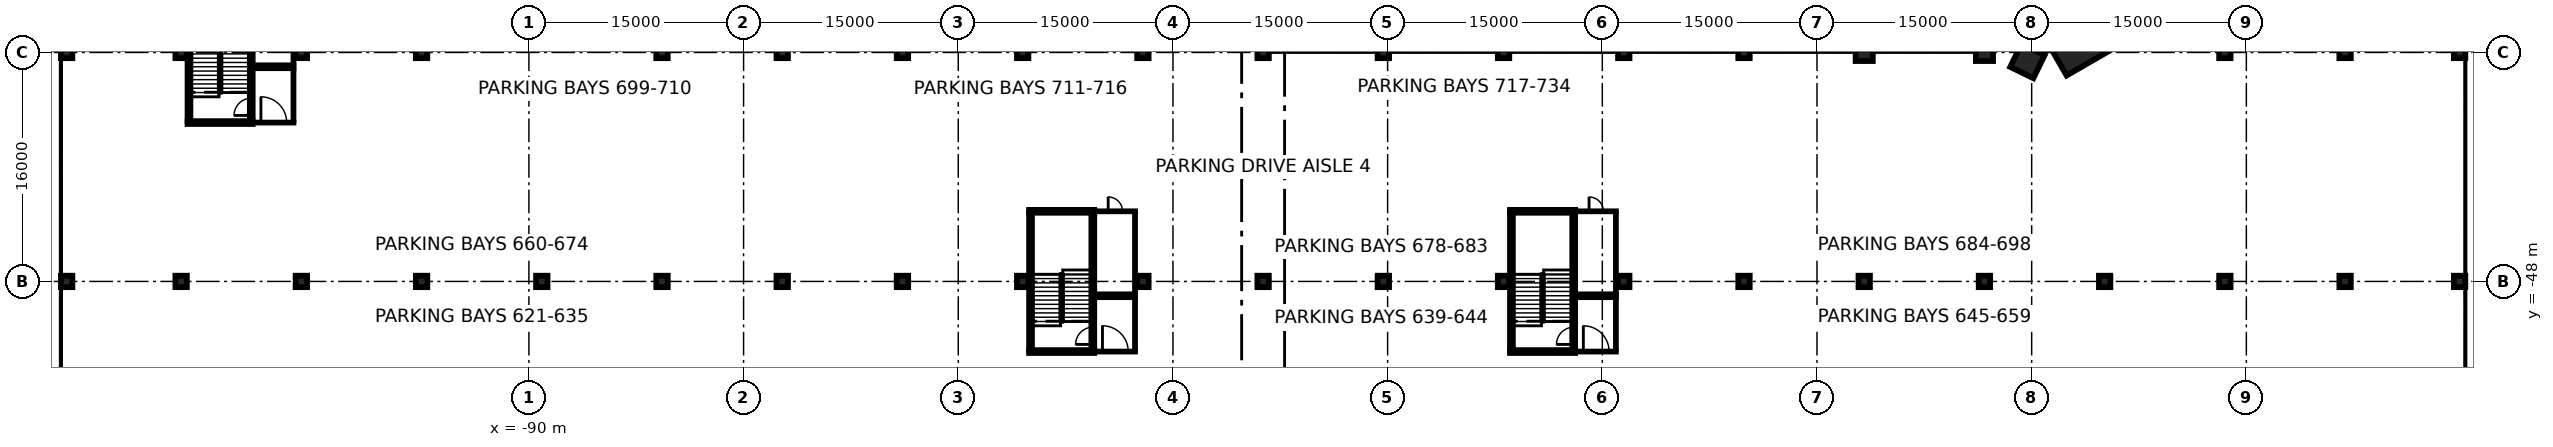
"""IFC4 building model, lengths in metres.
Left out: names, types, materials, properties, quantities, classifications, styles, units other than length and angle.
Written with IfcOpenShell. Run it as: python <this file> out.ifc"""

import sys

from ifc_helpers import new_model, si_unit, direction, frame, frame_2d, origin, origin_2d, place, context, subcontext, project, spatial, rectangle, extrude, element, fill, save


model = new_model("IFC4")
c1 = context("Model", 3, precision=1e-05, world=origin(), true_north=direction((0.0, 1.0)))
c2 = subcontext(c1, "Body", "Model", "MODEL_VIEW")
j1 = project(units=[si_unit("LENGTHUNIT", "METRE"), si_unit("PLANEANGLEUNIT", "RADIAN")], contexts=[c1])
p1 = place(None, origin())
s1 = spatial("IfcSite", under=j1, at=p1, CompositionType="ELEMENT")
p2 = place(p1, origin())
s2 = spatial("IfcBuilding", under=s1, at=p2, CompositionType="ELEMENT")
p3 = place(p2, frame((0.0, 0.0, -12.0)))
s3 = spatial("IfcBuildingStorey", under=s2, at=p3, CompositionType="ELEMENT", Elevation=-12.0)
for number, where, z_axis, x_axis in (
    (1, (-123.15, -80.0, 0.0), (0.0, 0.0, 1.0), (0.0, 1.0, 0.0)),
    (2, (45.75, -80.0, 0.0), (0.0, 0.0, 1.0), (0.0, 1.0, 0.0)),
):
    element("IfcWall", number, at=place(p3, frame(where, z_axis=z_axis, x_axis=x_axis)), inside=s3, PredefinedType="USERDEFINED", context=c2, shape_type="SweptSolid", body=[
        extrude(rectangle(XDim=160.0, YDim=0.9, at=frame_2d((80.0, 0.0))), origin(), (0.0, 0.0, 1.0), 11.55),
    ])
p4 = place(p2, frame((0.0, 0.0, -7.2)))
s4 = spatial("IfcBuildingStorey", under=s2, at=p4, CompositionType="ELEMENT", Elevation=-7.2)
p5 = place(p4, frame((17.865, -30.942, -0.4), z_axis=(0.0, 0.0, 1.0), x_axis=(-0.5, 0.866025403784, 0.0)))
e3 = element("IfcColumn", 3, at=p5, inside=s4, PredefinedType="COLUMN", context=c2, shape_type="SweptSolid", body=[
    extrude(rectangle(XDim=4.2, YDim=3.4, at=origin_2d()), origin(), (0.0, 0.0, 1.0), 3.6),
])
p6 = place(p4, frame((14.705, -32.599, -0.4), z_axis=(0.0, 0.0, 1.0), x_axis=(0.438341341409, 0.898808582743, 0.0)))
e4 = element("IfcColumn", 4, at=p6, inside=s4, PredefinedType="COLUMN", context=c2, shape_type="SweptSolid", body=[
    extrude(rectangle(XDim=1.8, YDim=1.8, at=origin_2d()), origin(), (0.0, 0.0, 1.0), 3.6),
])
for number, where, z_axis, x_axis in (
    (5, (-122.3, -48.0, -0.4), (0.0, 0.0, 1.0), (1.0, 0.0, 0.0)),
    (6, (-122.3, -32.0, -0.4), (0.0, 0.0, 1.0), (1.0, 0.0, 0.0)),
    (7, (-114.3, -48.0, -0.4), (0.0, 0.0, 1.0), (1.0, 0.0, 0.0)),
    (8, (-114.3, -32.0, -0.4), (0.0, 0.0, 1.0), (1.0, 0.0, 0.0)),
    (9, (-105.9, -48.0, -0.4), (0.0, 0.0, 1.0), (1.0, 0.0, 0.0)),
    (10, (-105.9, -32.0, -0.4), (0.0, 0.0, 1.0), (1.0, 0.0, 0.0)),
    (11, (-97.5, -48.0, -0.4), (0.0, 0.0, 1.0), (1.0, 0.0, 0.0)),
    (12, (-97.5, -32.0, -0.4), (0.0, 0.0, 1.0), (1.0, 0.0, 0.0)),
    (13, (-89.1, -48.0, -0.4), (0.0, 0.0, 1.0), (1.0, 0.0, 0.0)),
    (14, (-80.7, -48.0, -0.4), (0.0, 0.0, 1.0), (1.0, 0.0, 0.0)),
    (15, (-80.7, -32.0, -0.4), (0.0, 0.0, 1.0), (1.0, 0.0, 0.0)),
    (16, (-72.3, -48.0, -0.4), (0.0, 0.0, 1.0), (1.0, 0.0, 0.0)),
    (17, (-72.3, -32.0, -0.4), (0.0, 0.0, 1.0), (1.0, 0.0, 0.0)),
    (18, (-63.9, -48.0, -0.4), (0.0, 0.0, 1.0), (1.0, 0.0, 0.0)),
    (19, (-63.9, -32.0, -0.4), (0.0, 0.0, 1.0), (1.0, 0.0, 0.0)),
    (20, (-55.5, -48.0, -0.4), (0.0, 0.0, 1.0), (1.0, 0.0, 0.0)),
    (21, (-55.5, -32.0, -0.4), (0.0, 0.0, 1.0), (1.0, 0.0, 0.0)),
    (22, (-47.1, -48.0, -0.4), (0.0, 0.0, 1.0), (1.0, 0.0, 0.0)),
    (23, (-47.1, -32.0, -0.4), (0.0, 0.0, 1.0), (1.0, 0.0, 0.0)),
    (24, (-38.7, -48.0, -0.4), (0.0, 0.0, 1.0), (1.0, 0.0, 0.0)),
    (25, (-38.7, -32.0, -0.4), (0.0, 0.0, 1.0), (1.0, 0.0, 0.0)),
    (26, (-30.3, -48.0, -0.4), (0.0, 0.0, 1.0), (1.0, 0.0, 0.0)),
    (27, (-30.3, -32.0, -0.4), (0.0, 0.0, 1.0), (1.0, 0.0, 0.0)),
    (28, (-21.9, -48.0, -0.4), (0.0, 0.0, 1.0), (1.0, 0.0, 0.0)),
    (29, (-21.9, -32.0, -0.4), (0.0, 0.0, 1.0), (1.0, 0.0, 0.0)),
    (30, (-13.5, -48.0, -0.4), (0.0, 0.0, 1.0), (1.0, 0.0, 0.0)),
    (31, (-13.5, -32.0, -0.4), (0.0, 0.0, 1.0), (1.0, 0.0, 0.0)),
    (32, (-5.1, -48.0, -0.4), (0.0, 0.0, 1.0), (1.0, 0.0, 0.0)),
    (33, (-5.1, -32.0, -0.4), (0.0, 0.0, 1.0), (1.0, 0.0, 0.0)),
    (34, (3.3, -48.0, -0.4), (0.0, 0.0, 1.0), (1.0, 0.0, 0.0)),
):
    element("IfcColumn", number, at=place(p4, frame(where, z_axis=z_axis, x_axis=x_axis)), inside=s4, PredefinedType="COLUMN", context=c2, shape_type="SweptSolid", body=[
        extrude(rectangle(XDim=0.8, YDim=0.8, at=origin_2d()), origin(), (0.0, 0.0, 1.0), 3.6),
    ])
p7 = place(p4, frame((3.3, -32.0, -0.4), z_axis=(0.0, 0.0, 1.0), x_axis=(1.0, 0.0, 0.0)))
e35 = element("IfcColumn", 35, at=p7, inside=s4, PredefinedType="COLUMN", context=c2, shape_type="SweptSolid", body=[
    extrude(rectangle(XDim=1.2, YDim=1.2, at=origin_2d()), origin(), (0.0, 0.0, 1.0), 3.6),
])
p8 = place(p4, frame((11.7, -48.0, -0.4), z_axis=(0.0, 0.0, 1.0), x_axis=(1.0, 0.0, 0.0)))
e36 = element("IfcColumn", 36, at=p8, inside=s4, PredefinedType="COLUMN", context=c2, shape_type="SweptSolid", body=[
    extrude(rectangle(XDim=0.8, YDim=0.8, at=origin_2d()), origin(), (0.0, 0.0, 1.0), 3.6),
])
p9 = place(p4, frame((11.7, -32.0, -0.4), z_axis=(0.0, 0.0, 1.0), x_axis=(1.0, 0.0, 0.0)))
e37 = element("IfcColumn", 37, at=p9, inside=s4, PredefinedType="COLUMN", context=c2, shape_type="SweptSolid", body=[
    extrude(rectangle(XDim=1.2, YDim=1.2, at=origin_2d()), origin(), (0.0, 0.0, 1.0), 3.6),
])
for number, where, z_axis, x_axis in (
    (38, (20.1, -48.0, -0.4), (0.0, 0.0, 1.0), (1.0, 0.0, 0.0)),
    (39, (28.5, -48.0, -0.4), (0.0, 0.0, 1.0), (1.0, 0.0, 0.0)),
    (40, (28.5, -32.0, -0.4), (0.0, 0.0, 1.0), (1.0, 0.0, 0.0)),
    (41, (36.9, -48.0, -0.4), (0.0, 0.0, 1.0), (1.0, 0.0, 0.0)),
    (42, (36.9, -32.0, -0.4), (0.0, 0.0, 1.0), (1.0, 0.0, 0.0)),
    (43, (44.9, -48.0, -0.4), (0.0, 0.0, 1.0), (1.0, 0.0, 0.0)),
    (44, (44.9, -32.0, -0.4), (0.0, 0.0, 1.0), (1.0, 0.0, 0.0)),
):
    element("IfcColumn", number, at=place(p4, frame(where, z_axis=z_axis, x_axis=x_axis)), inside=s4, PredefinedType="COLUMN", context=c2, shape_type="SweptSolid", body=[
        extrude(rectangle(XDim=0.8, YDim=0.8, at=origin_2d()), origin(), (0.0, 0.0, 1.0), 3.6),
    ])
p10 = place(p4, frame((-109.3, -36.9, 0.0), z_axis=(0.0, 0.0, 1.0), x_axis=(1.0, 0.0, 0.0)))
e45 = element("IfcWall", 45, at=p10, inside=s4, PredefinedType="PARTITIONING", context=c2, shape_type="SweptSolid", body=[
    extrude(rectangle(XDim=2.95, YDim=0.2, at=frame_2d((1.475, 0.0))), origin(), (0.0, 0.0, 1.0), 3.2),
])
p11 = place(p10, frame((0.575, 0.0, 0.0)))
e46 = element("IfcOpeningElement", 46, at=p11, cuts=e45, PredefinedType="OPENING", context=c2, shape_type="SweptSolid", body=[
    extrude(rectangle(XDim=1.8, YDim=2.1, at=frame_2d((0.9, 1.05))), frame((0.0, 0.11, 0.0), z_axis=(0.0, -1.0, 0.0), x_axis=(1.0, 0.0, 0.0)), (0.0, 0.0, 1.0), 0.22),
])
p12 = place(p4, frame((-109.3, -33.1, 0.0), z_axis=(0.0, 0.0, 1.0), x_axis=(1.0, 0.0, 0.0)))
e47 = element("IfcWall", 47, at=p12, inside=s4, PredefinedType="PARTITIONING", context=c2, shape_type="SweptSolid", body=[
    extrude(rectangle(XDim=2.95, YDim=0.2, at=frame_2d((1.475, 0.0))), origin(), (0.0, 0.0, 1.0), 3.2),
])
p13 = place(p4, frame((-106.45, -36.8, 0.0), z_axis=(0.0, 0.0, 1.0), x_axis=(0.0, 1.0, 0.0)))
e48 = element("IfcWall", 48, at=p13, inside=s4, PredefinedType="PARTITIONING", context=c2, shape_type="SweptSolid", body=[
    extrude(rectangle(XDim=3.6, YDim=0.2, at=frame_2d((1.8, 0.0))), origin(), (0.0, 0.0, 1.0), 3.2),
])
p14 = place(p4, frame((-109.3, -32.9, 0.0), z_axis=(0.0, 0.0, 1.0), x_axis=(1.0, 0.0, 0.0)))
e49 = element("IfcWall", 49, at=p14, inside=s4, PredefinedType="PARTITIONING", context=c2, shape_type="SweptSolid", body=[
    extrude(rectangle(XDim=2.95, YDim=0.2, at=frame_2d((1.475, 0.0))), origin(), (0.0, 0.0, 1.0), 3.2),
])
p15 = place(p4, frame((-106.45, -32.8, 0.0), z_axis=(0.0, 0.0, 1.0), x_axis=(0.0, 1.0, 0.0)))
e50 = element("IfcWall", 50, at=p15, inside=s4, PredefinedType="PARTITIONING", context=c2, shape_type="SweptSolid", body=[
    extrude(rectangle(XDim=5.6, YDim=0.2, at=frame_2d((2.8, 0.0))), origin(), (0.0, 0.0, 1.0), 3.2),
])
p16 = place(p4, frame((-50.5, -52.9, 0.0), z_axis=(0.0, 0.0, 1.0), x_axis=(1.0, 0.0, 0.0)))
e51 = element("IfcWall", 51, at=p16, inside=s4, PredefinedType="PARTITIONING", context=c2, shape_type="SweptSolid", body=[
    extrude(rectangle(XDim=2.95, YDim=0.2, at=frame_2d((1.475, 0.0))), origin(), (0.0, 0.0, 1.0), 3.2),
])
p17 = place(p16, frame((0.575, 0.0, 0.0)))
e52 = element("IfcOpeningElement", 52, at=p17, cuts=e51, PredefinedType="OPENING", context=c2, shape_type="SweptSolid", body=[
    extrude(rectangle(XDim=1.8, YDim=2.1, at=frame_2d((0.9, 1.05))), frame((0.0, 0.11, 0.0), z_axis=(0.0, -1.0, 0.0), x_axis=(1.0, 0.0, 0.0)), (0.0, 0.0, 1.0), 0.22),
])
p18 = place(p4, frame((-50.5, -49.1, 0.0), z_axis=(0.0, 0.0, 1.0), x_axis=(1.0, 0.0, 0.0)))
e53 = element("IfcWall", 53, at=p18, inside=s4, PredefinedType="PARTITIONING", context=c2, shape_type="SweptSolid", body=[
    extrude(rectangle(XDim=2.95, YDim=0.2, at=frame_2d((1.475, 0.0))), origin(), (0.0, 0.0, 1.0), 3.2),
])
p19 = place(p4, frame((-47.65, -52.8, 0.0), z_axis=(0.0, 0.0, 1.0), x_axis=(0.0, 1.0, 0.0)))
e54 = element("IfcWall", 54, at=p19, inside=s4, PredefinedType="PARTITIONING", context=c2, shape_type="SweptSolid", body=[
    extrude(rectangle(XDim=3.6, YDim=0.2, at=frame_2d((1.8, 0.0))), origin(), (0.0, 0.0, 1.0), 3.2),
])
p20 = place(p4, frame((-50.5, -48.9, 0.0), z_axis=(0.0, 0.0, 1.0), x_axis=(1.0, 0.0, 0.0)))
e55 = element("IfcWall", 55, at=p20, inside=s4, PredefinedType="PARTITIONING", context=c2, shape_type="SweptSolid", body=[
    extrude(rectangle(XDim=2.95, YDim=0.2, at=frame_2d((1.475, 0.0))), origin(), (0.0, 0.0, 1.0), 3.2),
])
p21 = place(p4, frame((-50.5, -43.1, 0.0), z_axis=(0.0, 0.0, 1.0), x_axis=(1.0, 0.0, 0.0)))
e56 = element("IfcWall", 56, at=p21, inside=s4, PredefinedType="PARTITIONING", context=c2, shape_type="SweptSolid", body=[
    extrude(rectangle(XDim=2.95, YDim=0.2, at=frame_2d((1.475, 0.0))), origin(), (0.0, 0.0, 1.0), 3.2),
])
p22 = place(p21, frame((0.975, 0.0, 0.0)))
e57 = element("IfcOpeningElement", 57, at=p22, cuts=e56, PredefinedType="OPENING", context=c2, shape_type="SweptSolid", body=[
    extrude(rectangle(XDim=1.0, YDim=2.1, at=frame_2d((0.5, 1.05))), frame((0.0, 0.11, 0.0), z_axis=(0.0, -1.0, 0.0), x_axis=(1.0, 0.0, 0.0)), (0.0, 0.0, 1.0), 0.22),
])
p23 = place(p4, frame((-47.65, -48.8, 0.0), z_axis=(0.0, 0.0, 1.0), x_axis=(0.0, 1.0, 0.0)))
e58 = element("IfcWall", 58, at=p23, inside=s4, PredefinedType="PARTITIONING", context=c2, shape_type="SweptSolid", body=[
    extrude(rectangle(XDim=5.6, YDim=0.2, at=frame_2d((2.8, 0.0))), origin(), (0.0, 0.0, 1.0), 3.2),
])
p24 = place(p4, frame((-16.9, -52.9, 0.0), z_axis=(0.0, 0.0, 1.0), x_axis=(1.0, 0.0, 0.0)))
e59 = element("IfcWall", 59, at=p24, inside=s4, PredefinedType="PARTITIONING", context=c2, shape_type="SweptSolid", body=[
    extrude(rectangle(XDim=2.95, YDim=0.2, at=frame_2d((1.475, 0.0))), origin(), (0.0, 0.0, 1.0), 3.2),
])
p25 = place(p24, frame((0.575, 0.0, 0.0)))
e60 = element("IfcOpeningElement", 60, at=p25, cuts=e59, PredefinedType="OPENING", context=c2, shape_type="SweptSolid", body=[
    extrude(rectangle(XDim=1.8, YDim=2.1, at=frame_2d((0.9, 1.05))), frame((0.0, 0.11, 0.0), z_axis=(0.0, -1.0, 0.0), x_axis=(1.0, 0.0, 0.0)), (0.0, 0.0, 1.0), 0.22),
])
p26 = place(p4, frame((-16.9, -49.1, 0.0), z_axis=(0.0, 0.0, 1.0), x_axis=(1.0, 0.0, 0.0)))
e61 = element("IfcWall", 61, at=p26, inside=s4, PredefinedType="PARTITIONING", context=c2, shape_type="SweptSolid", body=[
    extrude(rectangle(XDim=2.95, YDim=0.2, at=frame_2d((1.475, 0.0))), origin(), (0.0, 0.0, 1.0), 3.2),
])
p27 = place(p4, frame((-14.05, -52.8, 0.0), z_axis=(0.0, 0.0, 1.0), x_axis=(0.0, 1.0, 0.0)))
e62 = element("IfcWall", 62, at=p27, inside=s4, PredefinedType="PARTITIONING", context=c2, shape_type="SweptSolid", body=[
    extrude(rectangle(XDim=3.6, YDim=0.2, at=frame_2d((1.8, 0.0))), origin(), (0.0, 0.0, 1.0), 3.2),
])
p28 = place(p4, frame((-16.9, -48.9, 0.0), z_axis=(0.0, 0.0, 1.0), x_axis=(1.0, 0.0, 0.0)))
e63 = element("IfcWall", 63, at=p28, inside=s4, PredefinedType="PARTITIONING", context=c2, shape_type="SweptSolid", body=[
    extrude(rectangle(XDim=2.95, YDim=0.2, at=frame_2d((1.475, 0.0))), origin(), (0.0, 0.0, 1.0), 3.2),
])
p29 = place(p4, frame((-16.9, -43.1, 0.0), z_axis=(0.0, 0.0, 1.0), x_axis=(1.0, 0.0, 0.0)))
e64 = element("IfcWall", 64, at=p29, inside=s4, PredefinedType="PARTITIONING", context=c2, shape_type="SweptSolid", body=[
    extrude(rectangle(XDim=2.95, YDim=0.2, at=frame_2d((1.475, 0.0))), origin(), (0.0, 0.0, 1.0), 3.2),
])
p30 = place(p29, frame((0.975, 0.0, 0.0)))
e65 = element("IfcOpeningElement", 65, at=p30, cuts=e64, PredefinedType="OPENING", context=c2, shape_type="SweptSolid", body=[
    extrude(rectangle(XDim=1.0, YDim=2.1, at=frame_2d((0.5, 1.05))), frame((0.0, 0.11, 0.0), z_axis=(0.0, -1.0, 0.0), x_axis=(1.0, 0.0, 0.0)), (0.0, 0.0, 1.0), 0.22),
])
p31 = place(p4, frame((-14.05, -48.8, 0.0), z_axis=(0.0, 0.0, 1.0), x_axis=(0.0, 1.0, 0.0)))
e66 = element("IfcWall", 66, at=p31, inside=s4, PredefinedType="PARTITIONING", context=c2, shape_type="SweptSolid", body=[
    extrude(rectangle(XDim=5.6, YDim=0.2, at=frame_2d((2.8, 0.0))), origin(), (0.0, 0.0, 1.0), 3.2),
])
p32 = place(p4, frame((-113.75, -36.8, 0.0), z_axis=(0.0, 0.0, 1.0), x_axis=(0.0, 1.0, 0.0)))
e67 = element("IfcWall", 67, at=p32, inside=s4, PredefinedType="SOLIDWALL", context=c2, shape_type="SweptSolid", body=[
    extrude(rectangle(XDim=9.6, YDim=0.2, at=frame_2d((4.8, 0.0))), origin(), (0.0, 0.0, 1.0), 3.2),
])
p33 = place(p4, frame((-109.4, -36.8, 0.0), z_axis=(0.0, 0.0, 1.0), x_axis=(0.0, 1.0, 0.0)))
e68 = element("IfcWall", 68, at=p33, inside=s4, PredefinedType="SOLIDWALL", context=c2, shape_type="SweptSolid", body=[
    extrude(rectangle(XDim=9.6, YDim=0.2, at=frame_2d((4.8, 0.0))), origin(), (0.0, 0.0, 1.0), 3.2),
])
p34 = place(p33, frame((0.4, 0.0, 0.0)))
e69 = element("IfcOpeningElement", 69, at=p34, cuts=e68, PredefinedType="OPENING", context=c2, shape_type="SweptSolid", body=[
    extrude(rectangle(XDim=1.2, YDim=2.1, at=frame_2d((0.6, 1.05))), frame((0.0, 0.11, 0.0), z_axis=(0.0, -1.0, 0.0), x_axis=(1.0, 0.0, 0.0)), (0.0, 0.0, 1.0), 0.22),
])
p35 = place(p4, frame((-109.3, -36.9, 0.0), z_axis=(0.0, 0.0, 1.0), x_axis=(-1.0, 0.0, 0.0)))
e70 = element("IfcWall", 70, at=p35, inside=s4, PredefinedType="SOLIDWALL", context=c2, shape_type="SweptSolid", body=[
    extrude(rectangle(XDim=4.55, YDim=0.2, at=frame_2d((2.275, 0.0))), origin(), (0.0, 0.0, 1.0), 3.2),
])
p36 = place(p4, frame((-54.95, -52.8, 0.0), z_axis=(0.0, 0.0, 1.0), x_axis=(0.0, 1.0, 0.0)))
e71 = element("IfcWall", 71, at=p36, inside=s4, PredefinedType="SOLIDWALL", context=c2, shape_type="SweptSolid", body=[
    extrude(rectangle(XDim=9.6, YDim=0.2, at=frame_2d((4.8, 0.0))), origin(), (0.0, 0.0, 1.0), 3.2),
])
p37 = place(p4, frame((-50.6, -52.8, 0.0), z_axis=(0.0, 0.0, 1.0), x_axis=(0.0, 1.0, 0.0)))
e72 = element("IfcWall", 72, at=p37, inside=s4, PredefinedType="SOLIDWALL", context=c2, shape_type="SweptSolid", body=[
    extrude(rectangle(XDim=9.6, YDim=0.2, at=frame_2d((4.8, 0.0))), origin(), (0.0, 0.0, 1.0), 3.2),
])
p38 = place(p37, frame((0.4, 0.0, 0.0)))
e73 = element("IfcOpeningElement", 73, at=p38, cuts=e72, PredefinedType="OPENING", context=c2, shape_type="SweptSolid", body=[
    extrude(rectangle(XDim=1.2, YDim=2.1, at=frame_2d((0.6, 1.05))), frame((0.0, 0.11, 0.0), z_axis=(0.0, -1.0, 0.0), x_axis=(1.0, 0.0, 0.0)), (0.0, 0.0, 1.0), 0.22),
])
for number, where, z_axis, x_axis in (
    (74, (-50.5, -52.9, 0.0), (0.0, 0.0, 1.0), (-1.0, 0.0, 0.0)),
    (75, (-55.05, -43.1, 0.0), (0.0, 0.0, 1.0), (1.0, 0.0, 0.0)),
):
    element("IfcWall", number, at=place(p4, frame(where, z_axis=z_axis, x_axis=x_axis)), inside=s4, PredefinedType="SOLIDWALL", context=c2, shape_type="SweptSolid", body=[
        extrude(rectangle(XDim=4.55, YDim=0.2, at=frame_2d((2.275, 0.0))), origin(), (0.0, 0.0, 1.0), 3.2),
    ])
p39 = place(p4, frame((-21.35, -52.8, 0.0), z_axis=(0.0, 0.0, 1.0), x_axis=(0.0, 1.0, 0.0)))
e76 = element("IfcWall", 76, at=p39, inside=s4, PredefinedType="SOLIDWALL", context=c2, shape_type="SweptSolid", body=[
    extrude(rectangle(XDim=9.6, YDim=0.2, at=frame_2d((4.8, 0.0))), origin(), (0.0, 0.0, 1.0), 3.2),
])
p40 = place(p4, frame((-17.0, -52.8, 0.0), z_axis=(0.0, 0.0, 1.0), x_axis=(0.0, 1.0, 0.0)))
e77 = element("IfcWall", 77, at=p40, inside=s4, PredefinedType="SOLIDWALL", context=c2, shape_type="SweptSolid", body=[
    extrude(rectangle(XDim=9.6, YDim=0.2, at=frame_2d((4.8, 0.0))), origin(), (0.0, 0.0, 1.0), 3.2),
])
p41 = place(p40, frame((0.4, 0.0, 0.0)))
e78 = element("IfcOpeningElement", 78, at=p41, cuts=e77, PredefinedType="OPENING", context=c2, shape_type="SweptSolid", body=[
    extrude(rectangle(XDim=1.2, YDim=2.1, at=frame_2d((0.6, 1.05))), frame((0.0, 0.11, 0.0), z_axis=(0.0, -1.0, 0.0), x_axis=(1.0, 0.0, 0.0)), (0.0, 0.0, 1.0), 0.22),
])
for number, where, z_axis, x_axis in (
    (79, (-16.9, -52.9, 0.0), (0.0, 0.0, 1.0), (-1.0, 0.0, 0.0)),
    (80, (-21.45, -43.1, 0.0), (0.0, 0.0, 1.0), (1.0, 0.0, 0.0)),
):
    element("IfcWall", number, at=place(p4, frame(where, z_axis=z_axis, x_axis=x_axis)), inside=s4, PredefinedType="SOLIDWALL", context=c2, shape_type="SweptSolid", body=[
        extrude(rectangle(XDim=4.55, YDim=0.2, at=frame_2d((2.275, 0.0))), origin(), (0.0, 0.0, 1.0), 3.2),
    ])
p42 = place(p11, origin())
e81 = element("IfcDoor", 81, at=p42, inside=s4, OperationType="DOUBLE_DOOR_SINGLE_SWING", PredefinedType="DOOR", context=c2, shape_type="SweptSolid", body=[
    extrude(rectangle(XDim=1.8, YDim=2.1, at=frame_2d((0.9, 1.05))), frame((0.0, 0.025, 0.0), z_axis=(0.0, -1.0, 0.0), x_axis=(1.0, 0.0, 0.0)), (0.0, 0.0, 1.0), 0.05),
])
fill(e46, e81)
p43 = place(p17, origin())
e82 = element("IfcDoor", 82, at=p43, inside=s4, OperationType="DOUBLE_DOOR_SINGLE_SWING", PredefinedType="DOOR", context=c2, shape_type="SweptSolid", body=[
    extrude(rectangle(XDim=1.8, YDim=2.1, at=frame_2d((0.9, 1.05))), frame((0.0, 0.025, 0.0), z_axis=(0.0, -1.0, 0.0), x_axis=(1.0, 0.0, 0.0)), (0.0, 0.0, 1.0), 0.05),
])
fill(e52, e82)
p44 = place(p22, origin())
e83 = element("IfcDoor", 83, at=p44, inside=s4, OperationType="SINGLE_SWING_LEFT", PredefinedType="DOOR", context=c2, shape_type="SweptSolid", body=[
    extrude(rectangle(XDim=1.0, YDim=2.1, at=frame_2d((0.5, 1.05))), frame((0.0, 0.025, 0.0), z_axis=(0.0, -1.0, 0.0), x_axis=(1.0, 0.0, 0.0)), (0.0, 0.0, 1.0), 0.05),
])
fill(e57, e83)
p45 = place(p25, origin())
e84 = element("IfcDoor", 84, at=p45, inside=s4, OperationType="DOUBLE_DOOR_SINGLE_SWING", PredefinedType="DOOR", context=c2, shape_type="SweptSolid", body=[
    extrude(rectangle(XDim=1.8, YDim=2.1, at=frame_2d((0.9, 1.05))), frame((0.0, 0.025, 0.0), z_axis=(0.0, -1.0, 0.0), x_axis=(1.0, 0.0, 0.0)), (0.0, 0.0, 1.0), 0.05),
])
fill(e60, e84)
p46 = place(p30, origin())
e85 = element("IfcDoor", 85, at=p46, inside=s4, OperationType="SINGLE_SWING_LEFT", PredefinedType="DOOR", context=c2, shape_type="SweptSolid", body=[
    extrude(rectangle(XDim=1.0, YDim=2.1, at=frame_2d((0.5, 1.05))), frame((0.0, 0.025, 0.0), z_axis=(0.0, -1.0, 0.0), x_axis=(1.0, 0.0, 0.0)), (0.0, 0.0, 1.0), 0.05),
])
fill(e65, e85)
p47 = place(p34, origin())
e86 = element("IfcDoor", 86, at=p47, inside=s4, OperationType="SINGLE_SWING_LEFT", PredefinedType="DOOR", context=c2, shape_type="SweptSolid", body=[
    extrude(rectangle(XDim=1.2, YDim=2.1, at=frame_2d((0.6, 1.05))), frame((0.0, 0.025, 0.0), z_axis=(0.0, -1.0, 0.0), x_axis=(1.0, 0.0, 0.0)), (0.0, 0.0, 1.0), 0.05),
])
fill(e69, e86)
p48 = place(p38, origin())
e87 = element("IfcDoor", 87, at=p48, inside=s4, OperationType="SINGLE_SWING_LEFT", PredefinedType="DOOR", context=c2, shape_type="SweptSolid", body=[
    extrude(rectangle(XDim=1.2, YDim=2.1, at=frame_2d((0.6, 1.05))), frame((0.0, 0.025, 0.0), z_axis=(0.0, -1.0, 0.0), x_axis=(1.0, 0.0, 0.0)), (0.0, 0.0, 1.0), 0.05),
])
fill(e73, e87)
p49 = place(p41, origin())
e88 = element("IfcDoor", 88, at=p49, inside=s4, OperationType="SINGLE_SWING_LEFT", PredefinedType="DOOR", context=c2, shape_type="SweptSolid", body=[
    extrude(rectangle(XDim=1.2, YDim=2.1, at=frame_2d((0.6, 1.05))), frame((0.0, 0.025, 0.0), z_axis=(0.0, -1.0, 0.0), x_axis=(1.0, 0.0, 0.0)), (0.0, 0.0, 1.0), 0.05),
])
fill(e78, e88)
save(model, sys.argv[1])
